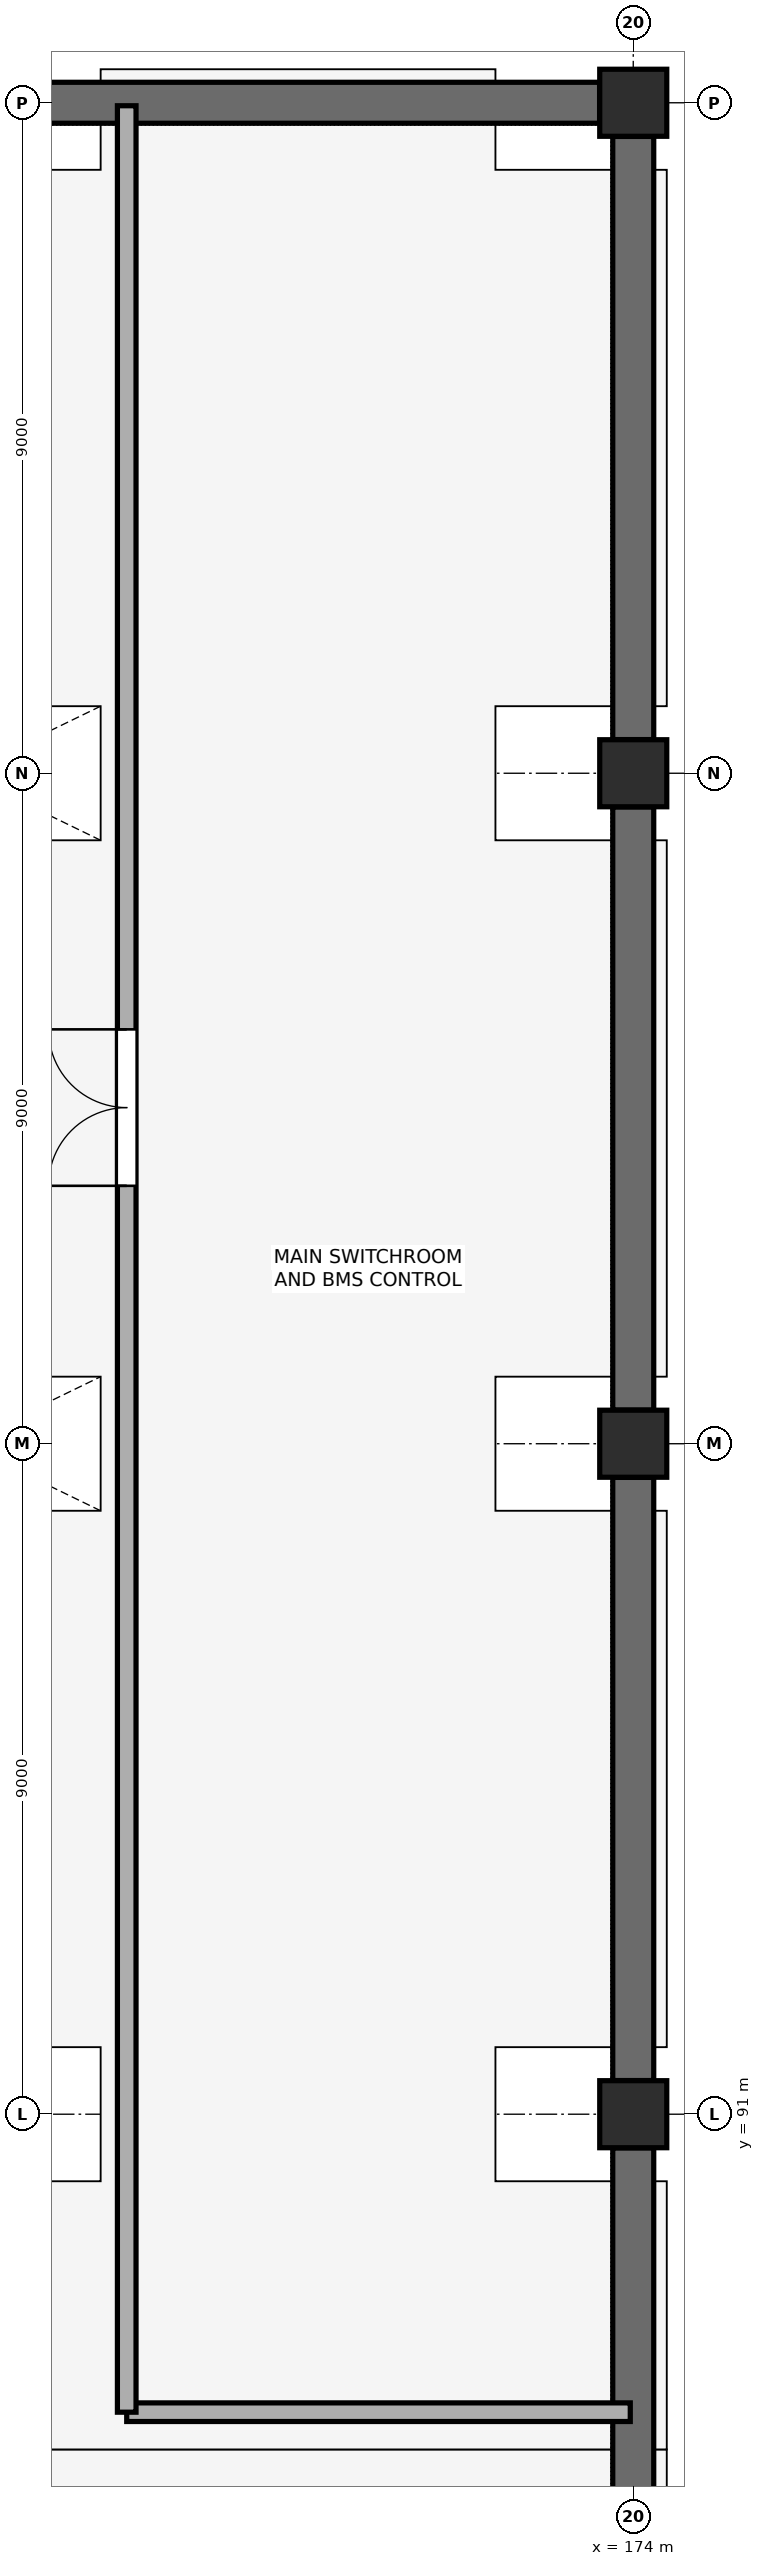
"""IFC4 building model, lengths in metres.
Left out: names, types, materials, properties, quantities, classifications, styles, units other than length and angle.
Written with IfcOpenShell. Run it as: python <this file> out.ifc"""

import sys

from ifc_helpers import new_model, si_unit, direction, frame, frame_2d, origin, origin_2d, place, context, subcontext, project, spatial, rectangle, extrude, element, fill, save


model = new_model("IFC4")
c1 = context("Model", 3, precision=1e-05, world=origin(), true_north=direction((0.0, 1.0)))
c2 = subcontext(c1, "Body", "Model", "MODEL_VIEW")
j1 = project(units=[si_unit("LENGTHUNIT", "METRE"), si_unit("PLANEANGLEUNIT", "RADIAN")], contexts=[c1])
p1 = place(None, origin())
s1 = spatial("IfcSite", under=j1, at=p1, CompositionType="ELEMENT")
p2 = place(p1, origin())
s2 = spatial("IfcBuilding", under=s1, at=p2, CompositionType="ELEMENT")
p3 = place(p2, frame((0.0, 0.0, -5.4)))
s3 = spatial("IfcBuildingStorey", under=s2, at=p3, CompositionType="ELEMENT", Elevation=-5.4)
for number, where, z_axis, x_axis in (
    (1, (174.0, 91.0, 0.0), (0.0, 0.0, 1.0), (1.0, 0.0, 0.0)),
    (2, (174.0, 100.0, 0.0), (0.0, 0.0, 1.0), (1.0, 0.0, 0.0)),
    (3, (174.0, 109.0, 0.0), (0.0, 0.0, 1.0), (1.0, 0.0, 0.0)),
    (4, (174.0, 118.0, 0.0), (0.0, 0.0, 1.0), (1.0, 0.0, 0.0)),
):
    element("IfcColumn", number, at=place(p3, frame(where, z_axis=z_axis, x_axis=x_axis)), inside=s3, PredefinedType="COLUMN", context=c2, shape_type="SweptSolid", body=[
        extrude(rectangle(XDim=0.9, YDim=0.9, at=origin_2d()), origin(), (0.0, 0.0, 1.0), 5.4),
    ])
for number, where, z_axis, x_axis in (
    (5, (165.452, 118.0, 0.0), (0.0, 0.0, 1.0), (1.0, 0.0, 0.0)),
    (6, (174.0, 117.548, 0.0), (0.0, 0.0, 1.0), (0.0, -1.0, 0.0)),
    (7, (174.0, 108.548, 0.0), (0.0, 0.0, 1.0), (0.0, -1.0, 0.0)),
    (8, (174.0, 99.548, 0.0), (0.0, 0.0, 1.0), (0.0, -1.0, 0.0)),
    (9, (174.0, 90.548, 0.0), (0.0, 0.0, 1.0), (0.0, -1.0, 0.0)),
):
    element("IfcWall", number, at=place(p3, frame(where, z_axis=z_axis, x_axis=x_axis)), inside=s3, PredefinedType="SOLIDWALL", context=c2, shape_type="SweptSolid", body=[
        extrude(rectangle(XDim=8.096, YDim=0.55, at=frame_2d((4.048, 0.0))), origin(), (0.0, 0.0, 1.0), 5.04),
    ])
p4 = place(p3, frame((173.96, 87.0, 0.0), z_axis=(0.0, 0.0, 1.0), x_axis=(-1.0, 0.0, 0.0)))
e10 = element("IfcWall", 10, at=p4, inside=s3, PredefinedType="STANDARD", context=c2, shape_type="SweptSolid", body=[
    extrude(rectangle(XDim=6.76, YDim=0.25, at=frame_2d((3.38, 0.0))), origin(), (0.0, 0.0, 1.0), 5.04),
])
p5 = place(p3, frame((167.2, 87.0, 0.0), z_axis=(0.0, 0.0, 1.0), x_axis=(0.0, 1.0, 0.0)))
e11 = element("IfcWall", 11, at=p5, inside=s3, PredefinedType="STANDARD", context=c2, shape_type="SweptSolid", body=[
    extrude(rectangle(XDim=30.96, YDim=0.25, at=frame_2d((15.48, 0.0))), origin(), (0.0, 0.0, 1.0), 5.04),
])
p6 = place(p5, frame((16.462, 0.0, 0.0)))
e12 = element("IfcOpeningElement", 12, at=p6, cuts=e11, PredefinedType="OPENING", context=c2, shape_type="SweptSolid", body=[
    extrude(rectangle(XDim=2.1, YDim=2.4, at=frame_2d((1.05, 1.2))), frame((0.0, 0.135, 0.0), z_axis=(0.0, -1.0, 0.0), x_axis=(1.0, 0.0, 0.0)), (0.0, 0.0, 1.0), 0.27),
])
p7 = place(p6, origin())
e13 = element("IfcDoor", 13, at=p7, inside=s3, OperationType="DOUBLE_DOOR_SINGLE_SWING", PredefinedType="DOOR", context=c2, shape_type="SweptSolid", body=[
    extrude(rectangle(XDim=2.1, YDim=2.4, at=frame_2d((1.05, 1.2))), frame((0.0, 0.025, 0.0), z_axis=(0.0, -1.0, 0.0), x_axis=(1.0, 0.0, 0.0)), (0.0, 0.0, 1.0), 0.05),
])
fill(e12, e13)
save(model, sys.argv[1])
